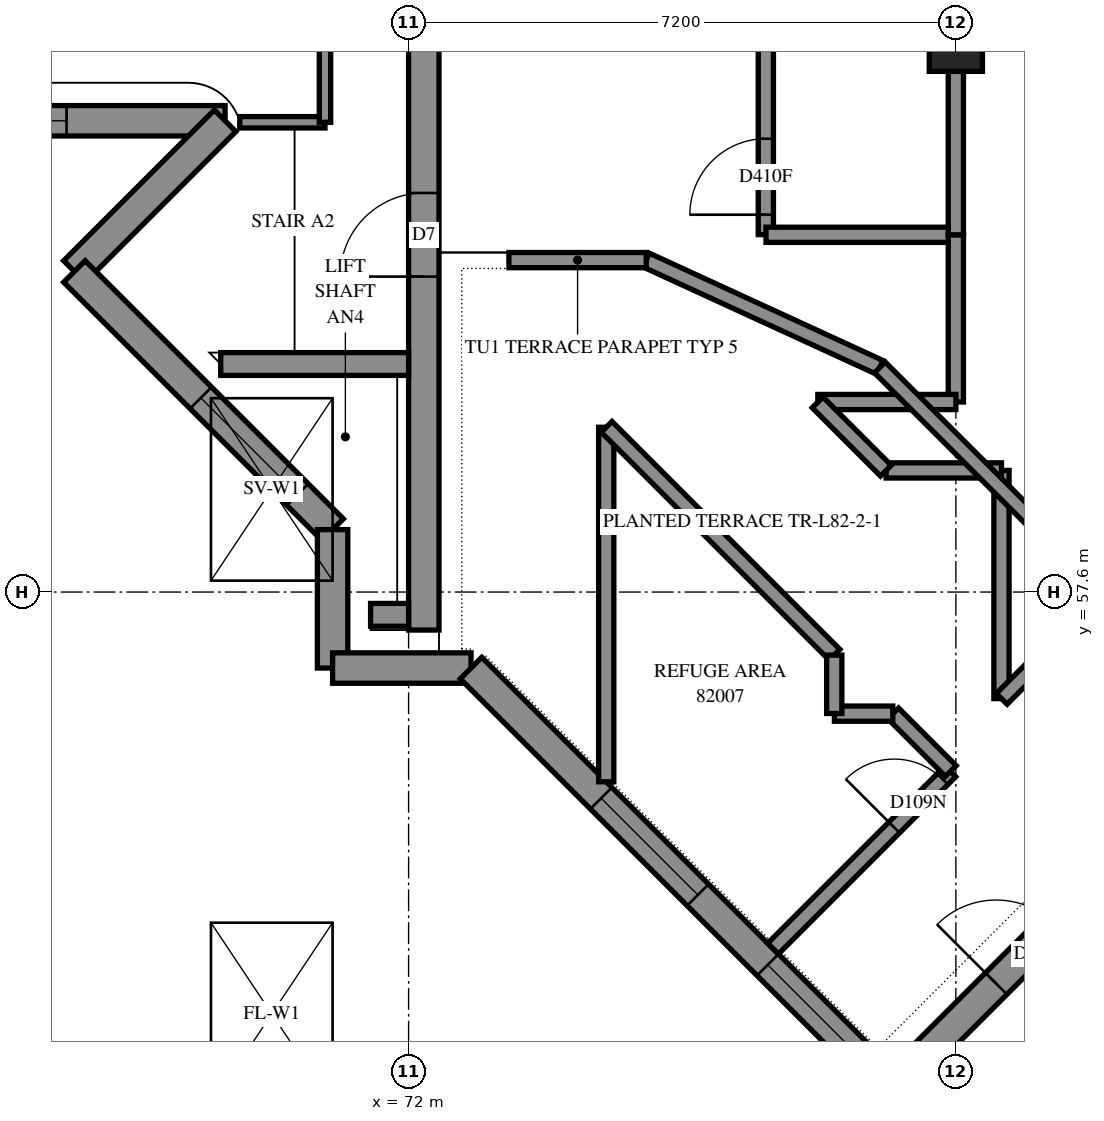
"""IFC4 building model, lengths in metres.
Left out: names, types, materials, properties, quantities, classifications, styles, units other than length and angle.
Written with IfcOpenShell. Run it as: python <this file> out.ifc"""

import sys

from ifc_helpers import new_model, si_unit, direction, frame, frame_2d, origin, origin_2d, place, context, subcontext, project, spatial, polyline, rectangle, outline, extrude, element, fill, save


model = new_model("IFC4")
c1 = context("Model", 3, precision=1e-05, world=origin(), true_north=direction((0.0, 1.0)))
c2 = subcontext(c1, "Body", "Model", "MODEL_VIEW")
j1 = project(units=[si_unit("LENGTHUNIT", "METRE"), si_unit("PLANEANGLEUNIT", "RADIAN")], contexts=[c1])
p1 = place(None, origin())
s1 = spatial("IfcSite", under=j1, at=p1, CompositionType="ELEMENT")
p2 = place(p1, origin())
s2 = spatial("IfcBuilding", under=s1, at=p2, CompositionType="ELEMENT")
p3 = place(p2, frame((0.0, 0.0, 302.0)))
s3 = spatial("IfcBuildingStorey", under=s2, at=p3, CompositionType="ELEMENT", Elevation=302.0)
p4 = place(p3, frame((79.2, 64.8, 0.0), z_axis=(0.0, 0.0, 1.0), x_axis=(1.0, 0.0, 0.0)))
e1 = element("IfcColumn", 1, at=p4, inside=s3, PredefinedType="COLUMN", context=c2, shape_type="SweptSolid", body=[
    extrude(rectangle(XDim=0.7, YDim=0.7, at=origin_2d()), origin(), (0.0, 0.0, 1.0), 3.5),
])
p5 = place(p3, frame((72.2, 57.1, -0.3), z_axis=(0.0, 0.0, 1.0), x_axis=(0.0, 1.0, 0.0)))
e2 = element("IfcWall", 2, at=p5, inside=s3, PredefinedType="SHEAR", context=c2, shape_type="SweptSolid", body=[
    extrude(outline(polyline([(0.0, 0.0), (7.7, 0.0), (7.7, 3.1), (0.0, 3.1), (0.0, 0.0)])), frame((0.0, 0.2, 0.0), z_axis=(0.0, -1.0, 0.0), x_axis=(1.0, 0.0, 0.0)), (0.0, 0.0, 1.0), 0.4),
])
p6 = place(p5, frame((4.65, 0.0, 0.3)))
e3 = element("IfcOpeningElement", 3, at=p6, cuts=e2, PredefinedType="OPENING", context=c2, shape_type="SweptSolid", body=[
    extrude(rectangle(XDim=1.1, YDim=2.1, at=frame_2d((0.55, 1.05))), frame((0.0, 0.21, 0.0), z_axis=(0.0, -1.0, 0.0), x_axis=(1.0, 0.0, 0.0)), (0.0, 0.0, 1.0), 0.42),
])
p7 = place(p3, frame((71.5, 57.3, 0.0), z_axis=(0.0, 0.0, 1.0), x_axis=(1.0, 0.0, 0.0)))
e4 = element("IfcWall", 4, at=p7, inside=s3, PredefinedType="SOLIDWALL", context=c2, shape_type="SweptSolid", body=[
    extrude(outline(polyline([(0.0, 0.0), (0.5, 0.0), (0.5, 3.5), (0.0, 3.5), (0.0, 0.0)])), frame((0.0, 0.15, 0.0), z_axis=(0.0, -1.0, 0.0), x_axis=(1.0, 0.0, 0.0)), (0.0, 0.0, 1.0), 0.3),
])
p8 = place(p3, frame((69.528, 60.6, 0.0), z_axis=(0.0, 0.0, 1.0), x_axis=(1.0, 0.0, 0.0)))
e5 = element("IfcWall", 5, at=p8, inside=s3, PredefinedType="SOLIDWALL", context=c2, shape_type="SweptSolid", body=[
    extrude(outline(polyline([(0.0, 0.0), (2.472, 0.0), (2.472, 3.5), (0.0, 3.5), (0.0, 0.0)])), frame((0.0, 0.15, 0.0), z_axis=(0.0, -1.0, 0.0), x_axis=(1.0, 0.0, 0.0)), (0.0, 0.0, 1.0), 0.3),
])
p9 = place(p3, frame((78.705, 51.423, -0.3), z_axis=(0.0, 0.0, 1.0), x_axis=(0.7071067812, 0.7071067812, 0.0)))
e6 = element("IfcWall", 6, at=p9, inside=s3, PredefinedType="SHEAR", context=c2, shape_type="SweptSolid", body=[
    extrude(outline(polyline([(0.0, 0.0), (11.3, 0.0), (11.3, 3.1), (0.0, 3.1), (0.0, 0.0)])), frame((0.0, 0.2, 0.0), z_axis=(0.0, -1.0, 0.0), x_axis=(1.0, 0.0, 0.0)), (0.0, 0.0, 1.0), 0.4),
])
p10 = place(p9, frame((1.45, 0.0, 0.3)))
e7 = element("IfcOpeningElement", 7, at=p10, cuts=e6, PredefinedType="OPENING", context=c2, shape_type="SweptSolid", body=[
    extrude(rectangle(XDim=1.1, YDim=2.1, at=frame_2d((0.55, 1.05))), frame((0.0, 0.21, 0.0), z_axis=(0.0, -1.0, 0.0), x_axis=(1.0, 0.0, 0.0)), (0.0, 0.0, 1.0), 0.42),
])
p11 = place(p9, frame((8.25, 0.0, 0.3)))
e8 = element("IfcOpeningElement", 8, at=p11, cuts=e6, PredefinedType="OPENING", context=c2, shape_type="SweptSolid", body=[
    extrude(rectangle(XDim=1.1, YDim=2.1, at=frame_2d((0.55, 1.05))), frame((0.0, 0.21, 0.0), z_axis=(0.0, -1.0, 0.0), x_axis=(1.0, 0.0, 0.0)), (0.0, 0.0, 1.0), 0.42),
])
p12 = place(p3, frame((55.367, 63.8, 0.0), z_axis=(0.0, 0.0, 1.0), x_axis=(1.0, 0.0, 0.0)))
e9 = element("IfcWall", 9, at=p12, inside=s3, PredefinedType="SOLIDWALL", context=c2, shape_type="SweptSolid", body=[
    extrude(outline(polyline([(-0.2, -0.2), (13.736, -0.2), (14.702, 0.2), (0.2, 0.2), (-0.2, -0.2)])), origin(), (0.0, 0.0, 1.0), 3.5),
])
p13 = place(p12, frame((3.283, 0.0, 0.7)))
e10 = element("IfcOpeningElement", 10, at=p13, cuts=e9, PredefinedType="OPENING", context=c2, shape_type="SweptSolid", body=[
    extrude(rectangle(XDim=1.8, YDim=2.2, at=frame_2d((0.9, 1.1))), frame((0.0, 0.21, 0.0), z_axis=(0.0, -1.0, 0.0), x_axis=(1.0, 0.0, 0.0)), (0.0, 0.0, 1.0), 0.42),
])
p14 = place(p12, frame((6.733, 0.0, 0.7)))
e11 = element("IfcOpeningElement", 11, at=p14, cuts=e9, PredefinedType="OPENING", context=c2, shape_type="SweptSolid", body=[
    extrude(rectangle(XDim=1.8, YDim=2.2, at=frame_2d((0.9, 1.1))), frame((0.0, 0.21, 0.0), z_axis=(0.0, -1.0, 0.0), x_axis=(1.0, 0.0, 0.0)), (0.0, 0.0, 1.0), 0.42),
])
p15 = place(p12, frame((10.333, 0.0, 0.7)))
e12 = element("IfcOpeningElement", 12, at=p15, cuts=e9, PredefinedType="OPENING", context=c2, shape_type="SweptSolid", body=[
    extrude(rectangle(XDim=1.8, YDim=2.2, at=frame_2d((0.9, 1.1))), frame((0.0, 0.21, 0.0), z_axis=(0.0, -1.0, 0.0), x_axis=(1.0, 0.0, 0.0)), (0.0, 0.0, 1.0), 0.42),
])
p16 = place(p3, frame((69.586, 63.8, 0.0), z_axis=(0.0, 0.0, 1.0), x_axis=(-0.7071067812, -0.7071067812, 0.0)))
e13 = element("IfcWall", 13, at=p16, inside=s3, PredefinedType="SOLIDWALL", context=c2, shape_type="SweptSolid", body=[
    extrude(outline(polyline([(0.483, -0.2), (3.003, -0.2), (2.603, 0.2), (-0.483, 0.2), (0.483, -0.2)])), origin(), (0.0, 0.0, 1.0), 3.5),
])
p17 = place(p3, frame((67.603, 61.818, 0.0), z_axis=(0.0, 0.0, 1.0), x_axis=(0.7071067812, -0.7071067812, 0.0)))
e14 = element("IfcWall", 14, at=p17, inside=s3, PredefinedType="SOLIDWALL", context=c2, shape_type="SweptSolid", body=[
    extrude(outline(polyline([(-0.2, -0.2), (4.721, -0.2), (4.886, 0.2), (0.2, 0.2), (-0.2, -0.2)])), origin(), (0.0, 0.0, 1.0), 3.5),
])
p18 = place(p17, frame((2.352, 0.0, 0.7)))
e15 = element("IfcOpeningElement", 15, at=p18, cuts=e14, PredefinedType="OPENING", context=c2, shape_type="SweptSolid", body=[
    extrude(rectangle(XDim=1.8, YDim=2.2, at=frame_2d((0.9, 1.1))), frame((0.0, 0.21, 0.0), z_axis=(0.0, -1.0, 0.0), x_axis=(1.0, 0.0, 0.0)), (0.0, 0.0, 1.0), 0.42),
])
p19 = place(p3, frame((71.0, 58.421, 0.0), z_axis=(0.0, 0.0, 1.0), x_axis=(0.0, -1.0, 0.0)))
e16 = element("IfcWall", 16, at=p19, inside=s3, PredefinedType="SOLIDWALL", context=c2, shape_type="SweptSolid", body=[
    extrude(outline(polyline([(0.083, -0.2), (2.021, -0.2), (1.621, 0.2), (-0.083, 0.2), (0.083, -0.2)])), origin(), (0.0, 0.0, 1.0), 3.5),
])
p20 = place(p3, frame((71.0, 56.6, 0.0), z_axis=(0.0, 0.0, 1.0), x_axis=(1.0, 0.0, 0.0)))
e17 = element("IfcWall", 17, at=p20, inside=s3, PredefinedType="SOLIDWALL", context=c2, shape_type="SweptSolid", body=[
    extrude(outline(polyline([(-0.2, -0.2), (1.738, -0.2), (1.904, 0.2), (0.2, 0.2), (-0.2, -0.2)])), origin(), (0.0, 0.0, 1.0), 3.5),
])
p21 = place(p3, frame((72.821, 56.6, 0.0), z_axis=(0.0, 0.0, 1.0), x_axis=(0.7071067812, -0.7071067812, 0.0)))
e18 = element("IfcWall", 18, at=p21, inside=s3, PredefinedType="SOLIDWALL", context=c2, shape_type="SweptSolid", body=[
    extrude(outline(polyline([(0.083, -0.2), (30.821, -0.2), (30.421, 0.2), (-0.083, 0.2), (0.083, -0.2)])), origin(), (0.0, 0.0, 1.0), 3.5),
])
p22 = place(p21, frame((2.421, 0.0, 0.7)))
e19 = element("IfcOpeningElement", 19, at=p22, cuts=e18, PredefinedType="OPENING", context=c2, shape_type="SweptSolid", body=[
    extrude(rectangle(XDim=1.8, YDim=2.2, at=frame_2d((0.9, 1.1))), frame((0.0, 0.21, 0.0), z_axis=(0.0, -1.0, 0.0), x_axis=(1.0, 0.0, 0.0)), (0.0, 0.0, 1.0), 0.42),
])
p23 = place(p21, frame((5.521, 0.0, 0.7)))
e20 = element("IfcOpeningElement", 20, at=p23, cuts=e18, PredefinedType="OPENING", context=c2, shape_type="SweptSolid", body=[
    extrude(rectangle(XDim=1.8, YDim=2.2, at=frame_2d((0.9, 1.1))), frame((0.0, 0.21, 0.0), z_axis=(0.0, -1.0, 0.0), x_axis=(1.0, 0.0, 0.0)), (0.0, 0.0, 1.0), 0.42),
])
p24 = place(p21, frame((8.921, 0.0, 0.7)))
e21 = element("IfcOpeningElement", 21, at=p24, cuts=e18, PredefinedType="OPENING", context=c2, shape_type="SweptSolid", body=[
    extrude(rectangle(XDim=1.8, YDim=2.2, at=frame_2d((0.9, 1.1))), frame((0.0, 0.21, 0.0), z_axis=(0.0, -1.0, 0.0), x_axis=(1.0, 0.0, 0.0)), (0.0, 0.0, 1.0), 0.42),
])
p25 = place(p21, frame((12.521, 0.0, 0.7)))
e22 = element("IfcOpeningElement", 22, at=p25, cuts=e18, PredefinedType="OPENING", context=c2, shape_type="SweptSolid", body=[
    extrude(rectangle(XDim=1.8, YDim=2.2, at=frame_2d((0.9, 1.1))), frame((0.0, 0.21, 0.0), z_axis=(0.0, -1.0, 0.0), x_axis=(1.0, 0.0, 0.0)), (0.0, 0.0, 1.0), 0.42),
])
p26 = place(p21, frame((16.121, 0.0, 0.7)))
e23 = element("IfcOpeningElement", 23, at=p26, cuts=e18, PredefinedType="OPENING", context=c2, shape_type="SweptSolid", body=[
    extrude(rectangle(XDim=1.8, YDim=2.2, at=frame_2d((0.9, 1.1))), frame((0.0, 0.21, 0.0), z_axis=(0.0, -1.0, 0.0), x_axis=(1.0, 0.0, 0.0)), (0.0, 0.0, 1.0), 0.42),
])
p27 = place(p21, frame((19.721, 0.0, 0.7)))
e24 = element("IfcOpeningElement", 24, at=p27, cuts=e18, PredefinedType="OPENING", context=c2, shape_type="SweptSolid", body=[
    extrude(rectangle(XDim=1.8, YDim=2.2, at=frame_2d((0.9, 1.1))), frame((0.0, 0.21, 0.0), z_axis=(0.0, -1.0, 0.0), x_axis=(1.0, 0.0, 0.0)), (0.0, 0.0, 1.0), 0.42),
])
p28 = place(p21, frame((23.071, 0.0, 0.7)))
e25 = element("IfcOpeningElement", 25, at=p28, cuts=e18, PredefinedType="OPENING", context=c2, shape_type="SweptSolid", body=[
    extrude(rectangle(XDim=1.8, YDim=2.2, at=frame_2d((0.9, 1.1))), frame((0.0, 0.21, 0.0), z_axis=(0.0, -1.0, 0.0), x_axis=(1.0, 0.0, 0.0)), (0.0, 0.0, 1.0), 0.42),
])
p29 = place(p21, frame((26.921, 0.0, 0.7)))
e26 = element("IfcOpeningElement", 26, at=p29, cuts=e18, PredefinedType="OPENING", context=c2, shape_type="SweptSolid", body=[
    extrude(rectangle(XDim=1.8, YDim=2.2, at=frame_2d((0.9, 1.1))), frame((0.0, 0.21, 0.0), z_axis=(0.0, -1.0, 0.0), x_axis=(1.0, 0.0, 0.0)), (0.0, 0.0, 1.0), 0.42),
])
p30 = place(p3, frame((78.2, 60.555, 0.0), z_axis=(0.0, 0.0, 1.0), x_axis=(-0.9086892736, 0.4174731177, 0.0)))
e27 = element("IfcWall", 27, at=p30, inside=s3, PredefinedType="PARAPET", context=c2, shape_type="SweptSolid", body=[
    extrude(outline(polyline([(-0.018, -0.1), (3.404, -0.1), (3.36, 0.1), (0.018, 0.1), (-0.018, -0.1)])), origin(), (0.0, 0.0, 1.0), 0.25),
])
p31 = place(p3, frame((69.779, 63.78, 0.0), z_axis=(0.0, 0.0, 1.0), x_axis=(1.0, 0.0, 0.0)))
e28 = element("IfcWall", 28, at=p31, inside=s3, PredefinedType="PARTITIONING", context=c2, shape_type="SweptSolid", body=[
    extrude(outline(polyline([(0.0, 0.0), (1.121, 0.0), (1.121, 3.5), (0.0, 3.5), (0.0, 0.0)])), frame((0.0, 0.075, 0.0), z_axis=(0.0, -1.0, 0.0), x_axis=(1.0, 0.0, 0.0)), (0.0, 0.0, 1.0), 0.15),
])
p32 = place(p3, frame((70.9, 63.78, 0.0), z_axis=(0.0, 0.0, 1.0), x_axis=(0.0, 1.0, 0.0)))
e29 = element("IfcWall", 29, at=p32, inside=s3, PredefinedType="PARTITIONING", context=c2, shape_type="SweptSolid", body=[
    extrude(outline(polyline([(0.0, 0.0), (1.02, 0.0), (1.02, 3.5), (0.0, 3.5), (0.0, 0.0)])), frame((0.0, 0.075, 0.0), z_axis=(0.0, -1.0, 0.0), x_axis=(1.0, 0.0, 0.0)), (0.0, 0.0, 1.0), 0.15),
])
p33 = place(p3, frame((79.2, 64.45, 0.0), z_axis=(0.0, 0.0, 1.0), x_axis=(0.0, 1.0, 0.0)))
e30 = element("IfcWall", 30, at=p33, inside=s3, PredefinedType="PARTITIONING", context=c2, shape_type="SweptSolid", body=[
    extrude(rectangle(XDim=7.9, YDim=0.2, at=frame_2d((3.95, 0.0))), origin(), (0.0, 0.0, 1.0), 3.5),
])
p34 = place(p3, frame((74.6, 55.104, 0.0), z_axis=(0.0, 0.0, 1.0), x_axis=(0.0, 1.0, 0.0)))
e31 = element("IfcWall", 31, at=p34, inside=s3, PredefinedType="PARTITIONING", context=c2, shape_type="SweptSolid", body=[
    extrude(rectangle(XDim=4.664, YDim=0.2, at=frame_2d((2.332, 0.0))), origin(), (0.0, 0.0, 1.0), 3.5),
])
p35 = place(p3, frame((76.7, 62.302, 0.0), z_axis=(0.0, 0.0, 1.0), x_axis=(0.0, 1.0, 0.0)))
e32 = element("IfcWall", 32, at=p35, inside=s3, PredefinedType="PARTITIONING", context=c2, shape_type="SweptSolid", body=[
    extrude(rectangle(XDim=4.798, YDim=0.2, at=frame_2d((2.399, 0.0))), origin(), (0.0, 0.0, 1.0), 3.5),
])
p36 = place(p35, frame((0.262, 0.0, 0.0)))
e33 = element("IfcOpeningElement", 33, at=p36, cuts=e32, PredefinedType="OPENING", context=c2, shape_type="SweptSolid", body=[
    extrude(rectangle(XDim=1.0, YDim=2.1, at=frame_2d((0.5, 1.05))), frame((0.0, 0.11, 0.0), z_axis=(0.0, -1.0, 0.0), x_axis=(1.0, 0.0, 0.0)), (0.0, 0.0, 1.0), 0.22),
])
p37 = place(p3, frame((74.605, 59.773, 0.0), z_axis=(0.0, 0.0, 1.0), x_axis=(0.7071067812, -0.7071067812, 0.0)))
e34 = element("IfcWall", 34, at=p37, inside=s3, PredefinedType="PARTITIONING", context=c2, shape_type="SweptSolid", body=[
    extrude(rectangle(XDim=4.24, YDim=0.2, at=frame_2d((2.12, 0.0))), origin(), (0.0, 0.0, 1.0), 3.5),
])
p38 = place(p3, frame((76.795, 52.909, 0.0), z_axis=(0.0, 0.0, 1.0), x_axis=(0.7071067812, 0.7071067812, 0.0)))
e35 = element("IfcWall", 35, at=p38, inside=s3, PredefinedType="PARTITIONING", context=c2, shape_type="SweptSolid", body=[
    extrude(rectangle(XDim=3.298, YDim=0.2, at=frame_2d((1.649, 0.0))), origin(), (0.0, 0.0, 1.0), 3.5),
])
p39 = place(p38, frame((2.254, 0.0, 0.0)))
e36 = element("IfcOpeningElement", 36, at=p39, cuts=e35, PredefinedType="OPENING", context=c2, shape_type="SweptSolid", body=[
    extrude(rectangle(XDim=0.9, YDim=2.1, at=frame_2d((0.45, 1.05))), frame((0.0, 0.11, 0.0), z_axis=(0.0, -1.0, 0.0), x_axis=(1.0, 0.0, 0.0)), (0.0, 0.0, 1.0), 0.22),
])
p40 = place(p3, frame((79.8, 56.198, 0.0), z_axis=(0.0, 0.0, 1.0), x_axis=(0.0, 1.0, 0.0)))
e37 = element("IfcWall", 37, at=p40, inside=s3, PredefinedType="PARTITIONING", context=c2, shape_type="SweptSolid", body=[
    extrude(rectangle(XDim=3.002, YDim=0.2, at=frame_2d((1.501, 0.0))), origin(), (0.0, 0.0, 1.0), 3.5),
])
p41 = place(p3, frame((76.702, 62.3, 0.0), z_axis=(0.0, 0.0, 1.0), x_axis=(1.0, 0.0, 0.0)))
e38 = element("IfcWall", 38, at=p41, inside=s3, PredefinedType="PARTITIONING", context=c2, shape_type="SweptSolid", body=[
    extrude(rectangle(XDim=2.498, YDim=0.2, at=frame_2d((1.249, 0.0))), origin(), (0.0, 0.0, 1.0), 3.5),
])
p42 = place(p3, frame((79.2, 60.1, 0.0), z_axis=(0.0, 0.0, 1.0), x_axis=(0.0, 1.0, 0.0)))
e39 = element("IfcWall", 39, at=p42, inside=s3, PredefinedType="PARTITIONING", context=c2, shape_type="SweptSolid", body=[
    extrude(rectangle(XDim=2.2, YDim=0.2, at=frame_2d((1.1, 0.0))), origin(), (0.0, 0.0, 1.0), 3.5),
])
p43 = place(p3, frame((79.2, 62.3, 0.0), z_axis=(0.0, 0.0, 1.0), x_axis=(0.0, 1.0, 0.0)))
e40 = element("IfcWall", 40, at=p43, inside=s3, PredefinedType="PARTITIONING", context=c2, shape_type="SweptSolid", body=[
    extrude(rectangle(XDim=2.15, YDim=0.2, at=frame_2d((1.075, 0.0))), origin(), (0.0, 0.0, 1.0), 3.5),
])
p44 = place(p3, frame((77.384, 60.1, 0.0), z_axis=(0.0, 0.0, 1.0), x_axis=(1.0, 0.0, 0.0)))
e41 = element("IfcWall", 41, at=p44, inside=s3, PredefinedType="PARTITIONING", context=c2, shape_type="SweptSolid", body=[
    extrude(rectangle(XDim=1.816, YDim=0.2, at=frame_2d((0.908, 0.0))), origin(), (0.0, 0.0, 1.0), 3.5),
])
p45 = place(p3, frame((78.282, 59.2, 0.0), z_axis=(0.0, 0.0, 1.0), x_axis=(1.0, 0.0, 0.0)))
e42 = element("IfcWall", 42, at=p45, inside=s3, PredefinedType="PARTITIONING", context=c2, shape_type="SweptSolid", body=[
    extrude(rectangle(XDim=1.518, YDim=0.2, at=frame_2d((0.759, 0.0))), origin(), (0.0, 0.0, 1.0), 3.5),
])
p46 = place(p3, frame((79.803, 56.195, 0.0), z_axis=(0.0, 0.0, 1.0), x_axis=(0.7063986127, 0.7078142412, 0.0)))
e43 = element("IfcWall", 43, at=p46, inside=s3, PredefinedType="PARTITIONING", context=c2, shape_type="SweptSolid", body=[
    extrude(rectangle(XDim=1.413, YDim=0.2, at=frame_2d((0.706, 0.0))), origin(), (0.0, 0.0, 1.0), 3.5),
])
p47 = place(p3, frame((77.381, 60.095, 0.0), z_axis=(0.0, 0.0, 1.0), x_axis=(0.7071067812, -0.7071067812, 0.0)))
e44 = element("IfcWall", 44, at=p47, inside=s3, PredefinedType="PARTITIONING", context=c2, shape_type="SweptSolid", body=[
    extrude(rectangle(XDim=1.27, YDim=0.2, at=frame_2d((0.635, 0.0))), origin(), (0.0, 0.0, 1.0), 3.5),
])
p48 = place(p3, frame((78.375, 56.003, 0.0), z_axis=(0.0, 0.0, 1.0), x_axis=(0.7071067812, -0.7071067812, 0.0)))
e45 = element("IfcWall", 45, at=p48, inside=s3, PredefinedType="PARTITIONING", context=c2, shape_type="SweptSolid", body=[
    extrude(rectangle(XDim=1.072, YDim=0.2, at=frame_2d((0.536, 0.0))), origin(), (0.0, 0.0, 1.0), 3.5),
])
for number, where, z_axis, x_axis in (
    (46, (77.602, 56.0, 0.0), (0.0, 0.0, 1.0), (1.0, 0.0, 0.0)),
    (47, (77.6, 56.002, 0.0), (0.0, 0.0, 1.0), (0.0, 1.0, 0.0)),
):
    element("IfcWall", number, at=place(p3, frame(where, z_axis=z_axis, x_axis=x_axis)), inside=s3, PredefinedType="PARTITIONING", context=c2, shape_type="SweptSolid", body=[
        extrude(rectangle(XDim=0.768, YDim=0.2, at=frame_2d((0.384, 0.0))), origin(), (0.0, 0.0, 1.0), 3.5),
    ])
p49 = place(p3, frame((80.531, 58.224, 0.0), z_axis=(0.0, 0.0, 1.0), x_axis=(-0.7071219462, 0.7070916158, 0.0)))
e48 = element("IfcWall", 48, at=p49, inside=s3, PredefinedType="PARAPET", context=c2, shape_type="SweptSolid", body=[
    extrude(outline(polyline([(0.0, -0.1), (3.315, -0.1), (3.279, 0.1), (0.0, 0.1), (0.0, -0.1)])), origin(), (0.0, 0.0, 1.0), 0.25),
])
p50 = place(p3, frame((75.127, 61.967, 0.0), z_axis=(0.0, 0.0, 1.0), x_axis=(-1.0, 0.0, 0.0)))
e49 = element("IfcWall", 49, at=p50, inside=s3, PredefinedType="PARAPET", context=c2, shape_type="SweptSolid", body=[
    extrude(outline(polyline([(-0.022, -0.1), (1.807, -0.1), (1.807, 0.1), (0.022, 0.1), (-0.022, -0.1)])), origin(), (0.0, 0.0, 1.0), 0.25),
])
p51 = place(p15, origin())
e50 = element("IfcWindow", 50, at=p51, inside=s3, PartitioningType="SINGLE_PANEL", PredefinedType="WINDOW", context=c2, shape_type="SweptSolid", body=[
    extrude(rectangle(XDim=1.8, YDim=2.2, at=frame_2d((0.9, 1.1))), frame((0.0, 0.15, 0.0), z_axis=(0.0, -1.0, 0.0), x_axis=(1.0, 0.0, 0.0)), (0.0, 0.0, 1.0), 0.06),
])
fill(e12, e50)
p52 = place(p18, origin())
e51 = element("IfcWindow", 51, at=p52, inside=s3, PartitioningType="SINGLE_PANEL", PredefinedType="WINDOW", context=c2, shape_type="SweptSolid", body=[
    extrude(rectangle(XDim=1.8, YDim=2.2, at=frame_2d((0.9, 1.1))), frame((0.0, 0.08, 0.0), z_axis=(0.0, -1.0, 0.0), x_axis=(1.0, 0.0, 0.0)), (0.0, 0.0, 1.0), 0.06),
])
fill(e15, e51)
p53 = place(p22, origin())
e52 = element("IfcWindow", 52, at=p53, inside=s3, PartitioningType="SINGLE_PANEL", PredefinedType="WINDOW", context=c2, shape_type="SweptSolid", body=[
    extrude(rectangle(XDim=1.8, YDim=2.2, at=frame_2d((0.9, 1.1))), frame((0.0, 0.08, 0.0), z_axis=(0.0, -1.0, 0.0), x_axis=(1.0, 0.0, 0.0)), (0.0, 0.0, 1.0), 0.06),
])
fill(e19, e52)
p54 = place(p23, origin())
e53 = element("IfcWindow", 53, at=p54, inside=s3, PartitioningType="SINGLE_PANEL", PredefinedType="WINDOW", context=c2, shape_type="SweptSolid", body=[
    extrude(rectangle(XDim=1.8, YDim=2.2, at=frame_2d((0.9, 1.1))), frame((0.0, 0.08, 0.0), z_axis=(0.0, -1.0, 0.0), x_axis=(1.0, 0.0, 0.0)), (0.0, 0.0, 1.0), 0.06),
])
fill(e20, e53)
p55 = place(p6, origin())
e54 = element("IfcDoor", 54, at=p55, inside=s3, OperationType="SINGLE_SWING_RIGHT", PredefinedType="DOOR", context=c2, shape_type="SweptSolid", body=[
    extrude(rectangle(XDim=1.1, YDim=2.1, at=frame_2d((0.55, 1.05))), frame((0.0, 0.025, 0.0), z_axis=(0.0, -1.0, 0.0), x_axis=(1.0, 0.0, 0.0)), (0.0, 0.0, 1.0), 0.05),
])
fill(e3, e54)
p56 = place(p10, origin())
e55 = element("IfcDoor", 55, at=p56, inside=s3, OperationType="DOUBLE_DOOR_SINGLE_SWING", PredefinedType="DOOR", context=c2, shape_type="SweptSolid", body=[
    extrude(rectangle(XDim=1.1, YDim=2.1, at=frame_2d((0.55, 1.05))), frame((0.0, 0.025, 0.0), z_axis=(0.0, -1.0, 0.0), x_axis=(1.0, 0.0, 0.0)), (0.0, 0.0, 1.0), 0.05),
])
fill(e7, e55)
p57 = place(p36, origin())
e56 = element("IfcDoor", 56, at=p57, inside=s3, OperationType="SINGLE_SWING_LEFT", PredefinedType="DOOR", context=c2, shape_type="SweptSolid", body=[
    extrude(rectangle(XDim=1.0, YDim=2.1, at=frame_2d((0.5, 1.05))), frame((0.0, 0.025, 0.0), z_axis=(0.0, -1.0, 0.0), x_axis=(1.0, 0.0, 0.0)), (0.0, 0.0, 1.0), 0.05),
])
fill(e33, e56)
p58 = place(p39, origin())
e57 = element("IfcDoor", 57, at=p58, inside=s3, OperationType="SINGLE_SWING_LEFT", PredefinedType="DOOR", context=c2, shape_type="SweptSolid", body=[
    extrude(rectangle(XDim=0.9, YDim=2.1, at=frame_2d((0.45, 1.05))), frame((0.0, 0.025, 0.0), z_axis=(0.0, -1.0, 0.0), x_axis=(1.0, 0.0, 0.0)), (0.0, 0.0, 1.0), 0.05),
])
fill(e36, e57)
save(model, sys.argv[1])
